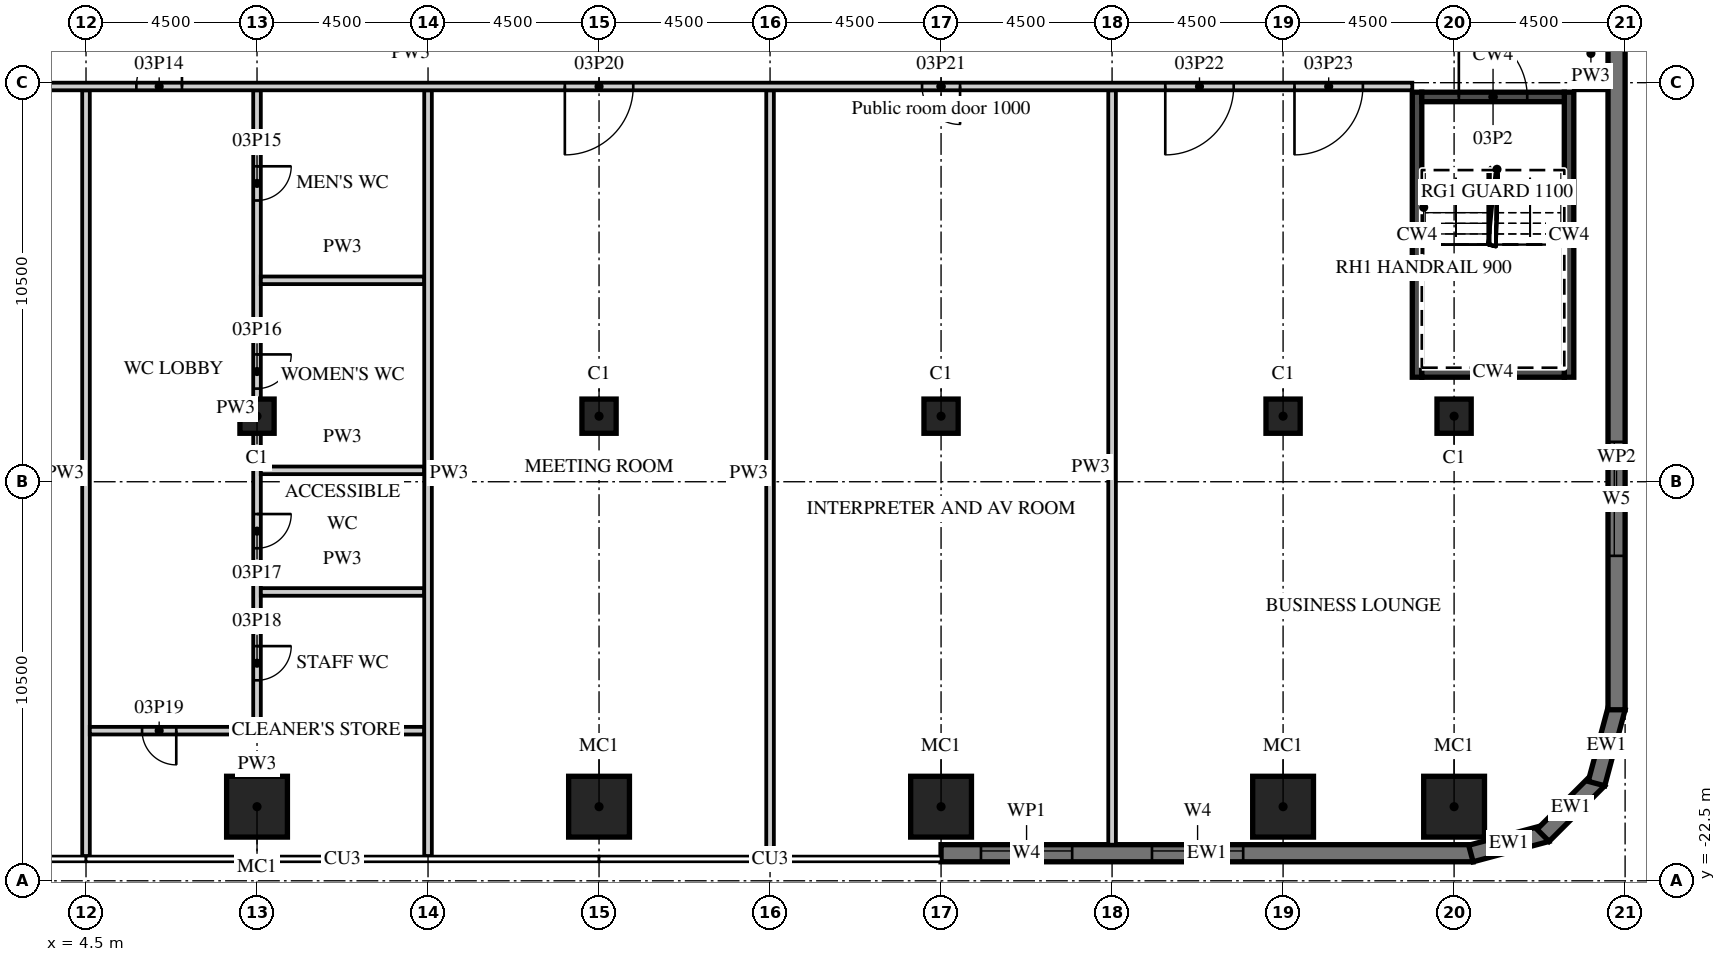
"""IFC4 building model, lengths in metres.
Left out: names, types, materials, properties, quantities, classifications, styles, units other than length and angle.
Written with IfcOpenShell. Run it as: python <this file> out.ifc"""

import sys

from ifc_helpers import new_model, si_unit, direction, frame, frame_2d, origin, origin_2d, place, context, subcontext, project, spatial, polyline, rectangle, outline, extrude, element, fill, save


model = new_model("IFC4")
c1 = context("Model", 3, precision=1e-05, world=origin(), true_north=direction((0.0, 1.0)))
c2 = subcontext(c1, "Body", "Model", "MODEL_VIEW")
j1 = project(units=[si_unit("LENGTHUNIT", "METRE"), si_unit("PLANEANGLEUNIT", "RADIAN")], contexts=[c1])
p1 = place(None, origin())
s1 = spatial("IfcSite", under=j1, at=p1, CompositionType="ELEMENT")
p2 = place(p1, origin())
s2 = spatial("IfcBuilding", under=s1, at=p2, CompositionType="ELEMENT")
p3 = place(p2, frame((0.0, 0.0, 23.5)))
s3 = spatial("IfcBuildingStorey", under=s2, at=p3, CompositionType="ELEMENT", Elevation=23.5)
for number, where, z_axis, x_axis in (
    (1, (9.0, -20.55, 0.0), (0.0, 0.0, 1.0), (1.0, 0.0, 0.0)),
    (2, (18.0, -20.55, 0.0), (0.0, 0.0, 1.0), (1.0, 0.0, 0.0)),
    (3, (27.0, -20.55, 0.0), (0.0, 0.0, 1.0), (1.0, 0.0, 0.0)),
    (4, (36.0, -20.55, 0.0), (0.0, 0.0, 1.0), (1.0, 0.0, 0.0)),
    (5, (40.5, -20.55, 0.0), (0.0, 0.0, 1.0), (1.0, 0.0, 0.0)),
):
    element("IfcColumn", number, at=place(p3, frame(where, z_axis=z_axis, x_axis=x_axis)), inside=s3, PredefinedType="COLUMN", context=c2, shape_type="SweptSolid", body=[
        extrude(rectangle(XDim=1.6, YDim=1.6, at=origin_2d()), origin(), (0.0, 0.0, 1.0), 5.5),
    ])
for number, where, z_axis, x_axis in (
    (6, (9.0, -10.275, 0.0), (0.0, 0.0, 1.0), (1.0, 0.0, 0.0)),
    (7, (18.0, -10.275, 0.0), (0.0, 0.0, 1.0), (1.0, 0.0, 0.0)),
    (8, (27.0, -10.275, 0.0), (0.0, 0.0, 1.0), (1.0, 0.0, 0.0)),
    (9, (36.0, -10.275, 0.0), (0.0, 0.0, 1.0), (1.0, 0.0, 0.0)),
    (10, (40.5, -10.275, 0.0), (0.0, 0.0, 1.0), (1.0, 0.0, 0.0)),
):
    element("IfcColumn", number, at=place(p3, frame(where, z_axis=z_axis, x_axis=x_axis)), inside=s3, PredefinedType="COLUMN", context=c2, shape_type="SweptSolid", body=[
        extrude(rectangle(XDim=0.9, YDim=0.9, at=origin_2d()), origin(), (0.0, 0.0, 1.0), 5.5),
    ])
p4 = place(p3, frame((27.0, -21.775, 0.0), z_axis=(0.0, 0.0, 1.0), x_axis=(1.0, 0.0, 0.0)))
e11 = element("IfcWall", 11, at=p4, inside=s3, PredefinedType="SOLIDWALL", context=c2, shape_type="SweptSolid", body=[
    extrude(rectangle(XDim=14.0, YDim=0.45, at=frame_2d((7.0, 0.0))), origin(), (0.0, 0.0, 1.0), 5.05),
])
p5 = place(p4, frame((1.05, 0.0, 0.9)))
e12 = element("IfcOpeningElement", 12, at=p5, cuts=e11, PredefinedType="OPENING", context=c2, shape_type="SweptSolid", body=[
    extrude(rectangle(XDim=2.4, YDim=1.8, at=frame_2d((1.2, 0.9))), frame((0.0, 0.235, 0.0), z_axis=(0.0, -1.0, 0.0), x_axis=(1.0, 0.0, 0.0)), (0.0, 0.0, 1.0), 0.47),
])
p6 = place(p4, frame((5.55, 0.0, 0.9)))
e13 = element("IfcOpeningElement", 13, at=p6, cuts=e11, PredefinedType="OPENING", context=c2, shape_type="SweptSolid", body=[
    extrude(rectangle(XDim=2.4, YDim=1.8, at=frame_2d((1.2, 0.9))), frame((0.0, 0.235, 0.0), z_axis=(0.0, -1.0, 0.0), x_axis=(1.0, 0.0, 0.0)), (0.0, 0.0, 1.0), 0.47),
])
p7 = place(p3, frame((40.942, -21.783, 0.0), z_axis=(0.0, 0.0, 1.0), x_axis=(0.965926999034, 0.25881466832, 0.0)))
e14 = element("IfcWall", 14, at=p7, inside=s3, PredefinedType="SOLIDWALL", context=c2, shape_type="SweptSolid", body=[
    extrude(outline(polyline([(0.0, -0.225), (2.071, -0.225), (1.95, 0.225), (0.121, 0.225), (0.0, -0.225)])), origin(), (0.0, 0.0, 1.0), 5.05),
])
p8 = place(p3, frame((42.841, -21.305, 0.0), z_axis=(0.0, 0.0, 1.0), x_axis=(0.707106781187, 0.707106781187, 0.0)))
e15 = element("IfcWall", 15, at=p8, inside=s3, PredefinedType="SOLIDWALL", context=c2, shape_type="SweptSolid", body=[
    extrude(outline(polyline([(0.0, -0.225), (2.071, -0.225), (1.95, 0.225), (0.121, 0.225), (0.0, -0.225)])), origin(), (0.0, 0.0, 1.0), 5.05),
])
p9 = place(p3, frame((44.247, -19.942, 0.0), z_axis=(0.0, 0.0, 1.0), x_axis=(0.25881466832, 0.965926999034, 0.0)))
e16 = element("IfcWall", 16, at=p9, inside=s3, PredefinedType="SOLIDWALL", context=c2, shape_type="SweptSolid", body=[
    extrude(outline(polyline([(-0.0, -0.225), (2.07, -0.225), (1.95, 0.225), (0.12, 0.225), (-0.0, -0.225)])), origin(), (0.0, 0.0, 1.0), 5.05),
])
p10 = place(p3, frame((44.775, -18.0, 0.0), z_axis=(0.0, 0.0, 1.0), x_axis=(0.0, 1.0, 0.0)))
e17 = element("IfcWall", 17, at=p10, inside=s3, PredefinedType="SOLIDWALL", context=c2, shape_type="SweptSolid", body=[
    extrude(rectangle(XDim=36.0, YDim=0.45, at=frame_2d((18.0, 0.0))), origin(), (0.0, 0.0, 1.0), 5.05),
])
p11 = place(p10, frame((4.05, 0.0, 0.9)))
e18 = element("IfcOpeningElement", 18, at=p11, cuts=e17, PredefinedType="OPENING", context=c2, shape_type="SweptSolid", body=[
    extrude(rectangle(XDim=3.0, YDim=1.8, at=frame_2d((1.5, 0.9))), frame((0.0, 0.235, 0.0), z_axis=(0.0, -1.0, 0.0), x_axis=(1.0, 0.0, 0.0)), (0.0, 0.0, 1.0), 0.47),
])
for number, where, z_axis, x_axis in (
    (19, (39.525, -9.25, 0.0), (0.0, 0.0, 1.0), (0.0, 1.0, 0.0)),
    (20, (43.525, -9.25, 0.0), (0.0, 0.0, 1.0), (0.0, 1.0, 0.0)),
):
    element("IfcWall", number, at=place(p3, frame(where, z_axis=z_axis, x_axis=x_axis)), inside=s3, PredefinedType="SHEAR", context=c2, shape_type="SweptSolid", body=[
        extrude(rectangle(XDim=7.5, YDim=0.25, at=frame_2d((3.75, 0.0))), origin(), (0.0, 0.0, 1.0), 5.05),
    ])
p12 = place(p3, frame((39.65, -9.125, 0.0), z_axis=(0.0, 0.0, 1.0), x_axis=(1.0, 0.0, 0.0)))
e21 = element("IfcWall", 21, at=p12, inside=s3, PredefinedType="SHEAR", context=c2, shape_type="SweptSolid", body=[
    extrude(rectangle(XDim=3.75, YDim=0.25, at=frame_2d((1.875, 0.0))), origin(), (0.0, 0.0, 1.0), 5.05),
])
p13 = place(p3, frame((39.65, -1.875, 0.0), z_axis=(0.0, 0.0, 1.0), x_axis=(1.0, 0.0, 0.0)))
e22 = element("IfcWall", 22, at=p13, inside=s3, PredefinedType="SHEAR", context=c2, shape_type="SweptSolid", body=[
    extrude(rectangle(XDim=3.75, YDim=0.25, at=frame_2d((1.875, 0.0))), origin(), (0.0, 0.0, 1.0), 5.05),
])
p14 = place(p13, frame((0.975, 0.0, 0.0)))
e23 = element("IfcOpeningElement", 23, at=p14, cuts=e22, PredefinedType="OPENING", context=c2, shape_type="SweptSolid", body=[
    extrude(rectangle(XDim=1.8, YDim=2.1, at=frame_2d((0.9, 1.05))), frame((0.0, 0.135, 0.0), z_axis=(0.0, -1.0, 0.0), x_axis=(1.0, 0.0, 0.0)), (0.0, 0.0, 1.0), 0.27),
])
p15 = place(p3, frame((4.5, -21.85, 0.0), z_axis=(0.0, 0.0, 1.0), x_axis=(0.0, 1.0, 0.0)))
e24 = element("IfcWall", 24, at=p15, inside=s3, PredefinedType="PARTITIONING", context=c2, shape_type="SweptSolid", body=[
    extrude(rectangle(XDim=20.15, YDim=0.2, at=frame_2d((10.075, 0.0))), origin(), (0.0, 0.0, 1.0), 5.05),
])
p16 = place(p3, frame((9.0, -18.45, 0.0), z_axis=(0.0, 0.0, 1.0), x_axis=(0.0, 1.0, 0.0)))
e25 = element("IfcWall", 25, at=p16, inside=s3, PredefinedType="PARTITIONING", context=c2, shape_type="SweptSolid", body=[
    extrude(rectangle(XDim=16.75, YDim=0.2, at=frame_2d((8.375, 0.0))), origin(), (0.0, 0.0, 1.0), 5.05),
])
p17 = place(p16, frame((13.85, 0.0, 0.0)))
e26 = element("IfcOpeningElement", 26, at=p17, cuts=e25, PredefinedType="OPENING", context=c2, shape_type="SweptSolid", body=[
    extrude(rectangle(XDim=0.9, YDim=2.1, at=frame_2d((0.45, 1.05))), frame((0.0, 0.11, 0.0), z_axis=(0.0, -1.0, 0.0), x_axis=(1.0, 0.0, 0.0)), (0.0, 0.0, 1.0), 0.22),
])
p18 = place(p16, frame((8.9, 0.0, 0.0)))
e27 = element("IfcOpeningElement", 27, at=p18, cuts=e25, PredefinedType="OPENING", context=c2, shape_type="SweptSolid", body=[
    extrude(rectangle(XDim=0.9, YDim=2.1, at=frame_2d((0.45, 1.05))), frame((0.0, 0.11, 0.0), z_axis=(0.0, -1.0, 0.0), x_axis=(1.0, 0.0, 0.0)), (0.0, 0.0, 1.0), 0.22),
])
p19 = place(p16, frame((4.7, 0.0, 0.0)))
e28 = element("IfcOpeningElement", 28, at=p19, cuts=e25, PredefinedType="OPENING", context=c2, shape_type="SweptSolid", body=[
    extrude(rectangle(XDim=0.9, YDim=2.1, at=frame_2d((0.45, 1.05))), frame((0.0, 0.11, 0.0), z_axis=(0.0, -1.0, 0.0), x_axis=(1.0, 0.0, 0.0)), (0.0, 0.0, 1.0), 0.22),
])
p20 = place(p16, frame((1.225, 0.0, 0.0)))
e29 = element("IfcOpeningElement", 29, at=p20, cuts=e25, PredefinedType="OPENING", context=c2, shape_type="SweptSolid", body=[
    extrude(rectangle(XDim=0.9, YDim=2.1, at=frame_2d((0.45, 1.05))), frame((0.0, 0.11, 0.0), z_axis=(0.0, -1.0, 0.0), x_axis=(1.0, 0.0, 0.0)), (0.0, 0.0, 1.0), 0.22),
])
for number, where, z_axis, x_axis in (
    (30, (9.1, -6.7, 0.0), (0.0, 0.0, 1.0), (1.0, 0.0, 0.0)),
    (31, (9.1, -11.7, 0.0), (0.0, 0.0, 1.0), (1.0, 0.0, 0.0)),
    (32, (9.1, -14.9, 0.0), (0.0, 0.0, 1.0), (1.0, 0.0, 0.0)),
):
    element("IfcWall", number, at=place(p3, frame(where, z_axis=z_axis, x_axis=x_axis)), inside=s3, PredefinedType="PARTITIONING", context=c2, shape_type="SweptSolid", body=[
        extrude(rectangle(XDim=4.3, YDim=0.2, at=frame_2d((2.15, 0.0))), origin(), (0.0, 0.0, 1.0), 5.05),
    ])
p21 = place(p3, frame((4.6, -18.55, 0.0), z_axis=(0.0, 0.0, 1.0), x_axis=(1.0, 0.0, 0.0)))
e33 = element("IfcWall", 33, at=p21, inside=s3, PredefinedType="PARTITIONING", context=c2, shape_type="SweptSolid", body=[
    extrude(rectangle(XDim=8.8, YDim=0.2, at=frame_2d((4.4, 0.0))), origin(), (0.0, 0.0, 1.0), 5.05),
])
p22 = place(p21, frame((1.375, 0.0, 0.0)))
e34 = element("IfcOpeningElement", 34, at=p22, cuts=e33, PredefinedType="OPENING", context=c2, shape_type="SweptSolid", body=[
    extrude(rectangle(XDim=0.9, YDim=2.1, at=frame_2d((0.45, 1.05))), frame((0.0, 0.11, 0.0), z_axis=(0.0, -1.0, 0.0), x_axis=(1.0, 0.0, 0.0)), (0.0, 0.0, 1.0), 0.22),
])
for number, where, z_axis, x_axis in (
    (35, (13.5, -21.85, 0.0), (0.0, 0.0, 1.0), (0.0, 1.0, 0.0)),
    (36, (22.5, -21.85, 0.0), (0.0, 0.0, 1.0), (0.0, 1.0, 0.0)),
):
    element("IfcWall", number, at=place(p3, frame(where, z_axis=z_axis, x_axis=x_axis)), inside=s3, PredefinedType="PARTITIONING", context=c2, shape_type="SweptSolid", body=[
        extrude(rectangle(XDim=20.15, YDim=0.2, at=frame_2d((10.075, 0.0))), origin(), (0.0, 0.0, 1.0), 5.05),
    ])
p23 = place(p3, frame((31.5, -21.55, 0.0), z_axis=(0.0, 0.0, 1.0), x_axis=(0.0, 1.0, 0.0)))
e37 = element("IfcWall", 37, at=p23, inside=s3, PredefinedType="PARTITIONING", context=c2, shape_type="SweptSolid", body=[
    extrude(rectangle(XDim=19.85, YDim=0.2, at=frame_2d((9.925, 0.0))), origin(), (0.0, 0.0, 1.0), 5.05),
])
p24 = place(p3, frame((-13.3, -1.6, 0.0), z_axis=(0.0, 0.0, 1.0), x_axis=(1.0, 0.0, 0.0)))
e38 = element("IfcWall", 38, at=p24, inside=s3, PredefinedType="PARTITIONING", context=c2, shape_type="SweptSolid", body=[
    extrude(rectangle(XDim=52.7, YDim=0.2, at=frame_2d((26.35, 0.0))), origin(), (0.0, 0.0, 1.0), 5.05),
])
p25 = place(p24, frame((4.41, 0.0, 0.0)))
e39 = element("IfcOpeningElement", 39, at=p25, cuts=e38, PredefinedType="OPENING", context=c2, shape_type="SweptSolid", body=[
    extrude(rectangle(XDim=1.8, YDim=2.1, at=frame_2d((0.9, 1.05))), frame((0.0, 0.11, 0.0), z_axis=(0.0, -1.0, 0.0), x_axis=(1.0, 0.0, 0.0)), (0.0, 0.0, 1.0), 0.22),
])
p26 = place(p24, frame((11.49, 0.0, 0.0)))
e40 = element("IfcOpeningElement", 40, at=p26, cuts=e38, PredefinedType="OPENING", context=c2, shape_type="SweptSolid", body=[
    extrude(rectangle(XDim=1.8, YDim=2.1, at=frame_2d((0.9, 1.05))), frame((0.0, 0.11, 0.0), z_axis=(0.0, -1.0, 0.0), x_axis=(1.0, 0.0, 0.0)), (0.0, 0.0, 1.0), 0.22),
])
p27 = place(p24, frame((19.125, 0.0, 0.0)))
e41 = element("IfcOpeningElement", 41, at=p27, cuts=e38, PredefinedType="OPENING", context=c2, shape_type="SweptSolid", body=[
    extrude(rectangle(XDim=1.2, YDim=2.1, at=frame_2d((0.6, 1.05))), frame((0.0, 0.11, 0.0), z_axis=(0.0, -1.0, 0.0), x_axis=(1.0, 0.0, 0.0)), (0.0, 0.0, 1.0), 0.22),
])
p28 = place(p24, frame((30.4, 0.0, 0.0)))
e42 = element("IfcOpeningElement", 42, at=p28, cuts=e38, PredefinedType="OPENING", context=c2, shape_type="SweptSolid", body=[
    extrude(rectangle(XDim=1.8, YDim=2.1, at=frame_2d((0.9, 1.05))), frame((0.0, 0.11, 0.0), z_axis=(0.0, -1.0, 0.0), x_axis=(1.0, 0.0, 0.0)), (0.0, 0.0, 1.0), 0.22),
])
p29 = place(p24, frame((39.8, 0.0, 0.0)))
e43 = element("IfcOpeningElement", 43, at=p29, cuts=e38, PredefinedType="OPENING", context=c2, shape_type="SweptSolid", body=[
    extrude(rectangle(XDim=1.0, YDim=2.1, at=frame_2d((0.5, 1.05))), frame((0.0, 0.11, 0.0), z_axis=(0.0, -1.0, 0.0), x_axis=(1.0, 0.0, 0.0)), (0.0, 0.0, 1.0), 0.22),
])
p30 = place(p24, frame((46.2, 0.0, 0.0)))
e44 = element("IfcOpeningElement", 44, at=p30, cuts=e38, PredefinedType="OPENING", context=c2, shape_type="SweptSolid", body=[
    extrude(rectangle(XDim=1.8, YDim=2.1, at=frame_2d((0.9, 1.05))), frame((0.0, 0.11, 0.0), z_axis=(0.0, -1.0, 0.0), x_axis=(1.0, 0.0, 0.0)), (0.0, 0.0, 1.0), 0.22),
])
p31 = place(p24, frame((49.6, 0.0, 0.0)))
e45 = element("IfcOpeningElement", 45, at=p31, cuts=e38, PredefinedType="OPENING", context=c2, shape_type="SweptSolid", body=[
    extrude(rectangle(XDim=1.8, YDim=2.1, at=frame_2d((0.9, 1.05))), frame((0.0, 0.11, 0.0), z_axis=(0.0, -1.0, 0.0), x_axis=(1.0, 0.0, 0.0)), (0.0, 0.0, 1.0), 0.22),
])
p32 = place(p3, frame((43.65, -1.6, 0.0), z_axis=(0.0, 0.0, 1.0), x_axis=(1.0, 0.0, 0.0)))
e46 = element("IfcWall", 46, at=p32, inside=s3, PredefinedType="PARTITIONING", context=c2, shape_type="SweptSolid", body=[
    extrude(rectangle(XDim=0.9, YDim=0.2, at=frame_2d((0.45, 0.0))), origin(), (0.0, 0.0, 1.0), 5.05),
])
p33 = place(p5, origin())
e47 = element("IfcWindow", 47, at=p33, inside=s3, PartitioningType="SINGLE_PANEL", PredefinedType="WINDOW", context=c2, shape_type="SweptSolid", body=[
    extrude(rectangle(XDim=2.4, YDim=1.8, at=frame_2d((1.2, 0.9))), frame((0.0, 0.09, 0.0), z_axis=(0.0, -1.0, 0.0), x_axis=(1.0, 0.0, 0.0)), (0.0, 0.0, 1.0), 0.06),
])
fill(e12, e47)
p34 = place(p6, origin())
e48 = element("IfcWindow", 48, at=p34, inside=s3, PartitioningType="SINGLE_PANEL", PredefinedType="WINDOW", context=c2, shape_type="SweptSolid", body=[
    extrude(rectangle(XDim=2.4, YDim=1.8, at=frame_2d((1.2, 0.9))), frame((0.0, 0.09, 0.0), z_axis=(0.0, -1.0, 0.0), x_axis=(1.0, 0.0, 0.0)), (0.0, 0.0, 1.0), 0.06),
])
fill(e13, e48)
p35 = place(p11, origin())
e49 = element("IfcWindow", 49, at=p35, inside=s3, PartitioningType="SINGLE_PANEL", PredefinedType="WINDOW", context=c2, shape_type="SweptSolid", body=[
    extrude(rectangle(XDim=3.0, YDim=1.8, at=frame_2d((1.5, 0.9))), frame((0.0, 0.09, 0.0), z_axis=(0.0, -1.0, 0.0), x_axis=(1.0, 0.0, 0.0)), (0.0, 0.0, 1.0), 0.06),
])
fill(e18, e49)
p36 = place(p14, origin())
e50 = element("IfcDoor", 50, at=p36, inside=s3, OperationType="DOUBLE_DOOR_DOUBLE_SWING", PredefinedType="DOOR", context=c2, shape_type="SweptSolid", body=[
    extrude(rectangle(XDim=1.8, YDim=2.1, at=frame_2d((0.9, 1.05))), frame((0.0, 0.025, 0.0), z_axis=(0.0, -1.0, 0.0), x_axis=(1.0, 0.0, 0.0)), (0.0, 0.0, 1.0), 0.05),
])
fill(e23, e50)
p37 = place(p27, origin())
e51 = element("IfcDoor", 51, at=p37, inside=s3, OperationType="SINGLE_SWING_RIGHT", PredefinedType="DOOR", context=c2, shape_type="SweptSolid", body=[
    extrude(rectangle(XDim=1.2, YDim=2.1, at=frame_2d((0.6, 1.05))), frame((0.0, 0.025, 0.0), z_axis=(0.0, -1.0, 0.0), x_axis=(1.0, 0.0, 0.0)), (0.0, 0.0, 1.0), 0.05),
])
fill(e41, e51)
p38 = place(p17, origin())
e52 = element("IfcDoor", 52, at=p38, inside=s3, OperationType="SINGLE_SWING_RIGHT", PredefinedType="DOOR", context=c2, shape_type="SweptSolid", body=[
    extrude(rectangle(XDim=0.9, YDim=2.1, at=frame_2d((0.45, 1.05))), frame((0.0, 0.025, 0.0), z_axis=(0.0, -1.0, 0.0), x_axis=(1.0, 0.0, 0.0)), (0.0, 0.0, 1.0), 0.05),
])
fill(e26, e52)
p39 = place(p18, origin())
e53 = element("IfcDoor", 53, at=p39, inside=s3, OperationType="SINGLE_SWING_RIGHT", PredefinedType="DOOR", context=c2, shape_type="SweptSolid", body=[
    extrude(rectangle(XDim=0.9, YDim=2.1, at=frame_2d((0.45, 1.05))), frame((0.0, 0.025, 0.0), z_axis=(0.0, -1.0, 0.0), x_axis=(1.0, 0.0, 0.0)), (0.0, 0.0, 1.0), 0.05),
])
fill(e27, e53)
p40 = place(p19, origin())
e54 = element("IfcDoor", 54, at=p40, inside=s3, OperationType="SINGLE_SWING_RIGHT", PredefinedType="DOOR", context=c2, shape_type="SweptSolid", body=[
    extrude(rectangle(XDim=0.9, YDim=2.1, at=frame_2d((0.45, 1.05))), frame((0.0, 0.025, 0.0), z_axis=(0.0, -1.0, 0.0), x_axis=(1.0, 0.0, 0.0)), (0.0, 0.0, 1.0), 0.05),
])
fill(e28, e54)
p41 = place(p20, origin())
e55 = element("IfcDoor", 55, at=p41, inside=s3, OperationType="SINGLE_SWING_RIGHT", PredefinedType="DOOR", context=c2, shape_type="SweptSolid", body=[
    extrude(rectangle(XDim=0.9, YDim=2.1, at=frame_2d((0.45, 1.05))), frame((0.0, 0.025, 0.0), z_axis=(0.0, -1.0, 0.0), x_axis=(1.0, 0.0, 0.0)), (0.0, 0.0, 1.0), 0.05),
])
fill(e29, e55)
p42 = place(p22, origin())
e56 = element("IfcDoor", 56, at=p42, inside=s3, OperationType="SINGLE_SWING_RIGHT", PredefinedType="DOOR", context=c2, shape_type="SweptSolid", body=[
    extrude(rectangle(XDim=0.9, YDim=2.1, at=frame_2d((0.45, 1.05))), frame((0.0, 0.025, 0.0), z_axis=(0.0, -1.0, 0.0), x_axis=(1.0, 0.0, 0.0)), (0.0, 0.0, 1.0), 0.05),
])
fill(e34, e56)
p43 = place(p28, origin())
e57 = element("IfcDoor", 57, at=p43, inside=s3, OperationType="DOUBLE_DOOR_DOUBLE_SWING", PredefinedType="DOOR", context=c2, shape_type="SweptSolid", body=[
    extrude(rectangle(XDim=1.8, YDim=2.1, at=frame_2d((0.9, 1.05))), frame((0.0, 0.025, 0.0), z_axis=(0.0, -1.0, 0.0), x_axis=(1.0, 0.0, 0.0)), (0.0, 0.0, 1.0), 0.05),
])
fill(e42, e57)
p44 = place(p29, origin())
e58 = element("IfcDoor", 58, at=p44, inside=s3, OperationType="SINGLE_SWING_RIGHT", PredefinedType="DOOR", context=c2, shape_type="SweptSolid", body=[
    extrude(rectangle(XDim=1.0, YDim=2.1, at=frame_2d((0.5, 1.05))), frame((0.0, 0.025, 0.0), z_axis=(0.0, -1.0, 0.0), x_axis=(1.0, 0.0, 0.0)), (0.0, 0.0, 1.0), 0.05),
])
fill(e43, e58)
p45 = place(p30, origin())
e59 = element("IfcDoor", 59, at=p45, inside=s3, OperationType="DOUBLE_DOOR_DOUBLE_SWING", PredefinedType="DOOR", context=c2, shape_type="SweptSolid", body=[
    extrude(rectangle(XDim=1.8, YDim=2.1, at=frame_2d((0.9, 1.05))), frame((0.0, 0.025, 0.0), z_axis=(0.0, -1.0, 0.0), x_axis=(1.0, 0.0, 0.0)), (0.0, 0.0, 1.0), 0.05),
])
fill(e44, e59)
p46 = place(p31, origin())
e60 = element("IfcDoor", 60, at=p46, inside=s3, OperationType="DOUBLE_DOOR_DOUBLE_SWING", PredefinedType="DOOR", context=c2, shape_type="SweptSolid", body=[
    extrude(rectangle(XDim=1.8, YDim=2.1, at=frame_2d((0.9, 1.05))), frame((0.0, 0.025, 0.0), z_axis=(0.0, -1.0, 0.0), x_axis=(1.0, 0.0, 0.0)), (0.0, 0.0, 1.0), 0.05),
])
fill(e45, e60)
save(model, sys.argv[1])
